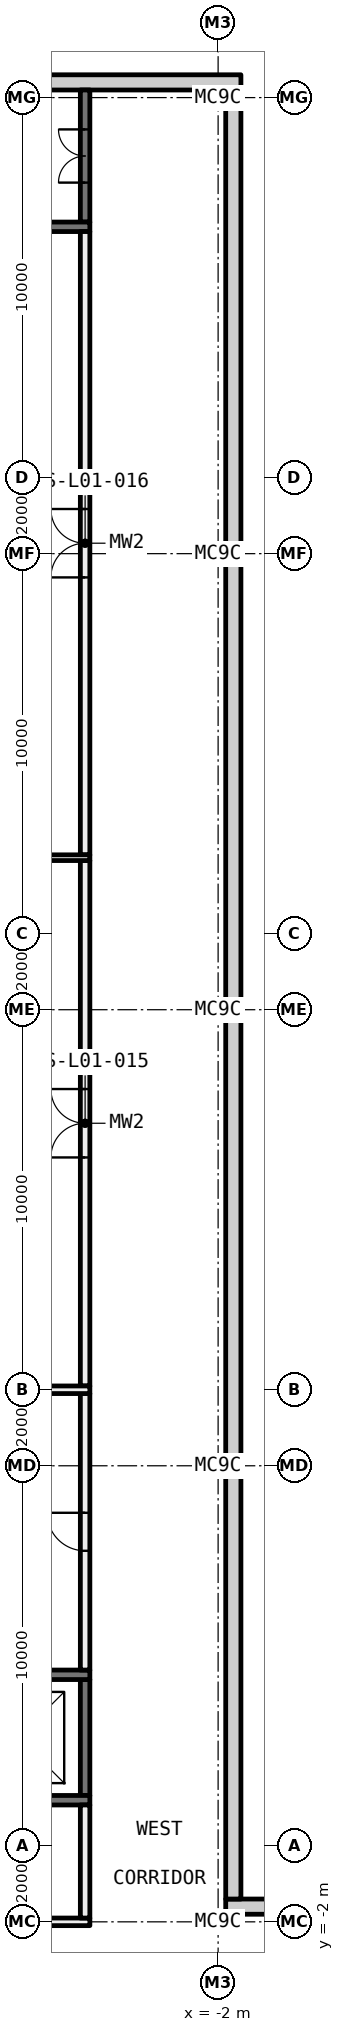
"""IFC4 building model, lengths in metres.
Left out: names, types, materials, properties, quantities, classifications, styles, units other than length and angle.
Written with IfcOpenShell. Run it as: python <this file> out.ifc"""

import sys

from ifc_helpers import new_model, si_unit, direction, frame, frame_2d, origin, origin_2d, place, context, subcontext, project, spatial, rectangle, i_section, extrude, element, fill, save


model = new_model("IFC4")
c1 = context("Model", 3, precision=1e-05, world=origin(), true_north=direction((0.0, 1.0)))
c2 = subcontext(c1, "Body", "Model", "MODEL_VIEW")
j1 = project(units=[si_unit("LENGTHUNIT", "METRE"), si_unit("PLANEANGLEUNIT", "RADIAN")], contexts=[c1])
p1 = place(None, origin())
s1 = spatial("IfcSite", under=j1, at=p1, CompositionType="ELEMENT")
p2 = place(p1, origin())
s2 = spatial("IfcBuilding", under=s1, at=p2, CompositionType="ELEMENT")
p3 = place(p2, frame((0.0, 0.0, 6.0)))
s3 = spatial("IfcBuildingStorey", under=s2, at=p3, CompositionType="ELEMENT", Elevation=6.0)
for number, where, z_axis, x_axis in (
    (1, (-2.0, -2.0, 0.0), (0.0, 0.0, 1.0), (1.0, 0.0, 0.0)),
    (2, (-2.0, 10.0, 0.0), (0.0, 0.0, 1.0), (1.0, 0.0, 0.0)),
    (3, (-2.0, 22.0, 0.0), (0.0, 0.0, 1.0), (1.0, 0.0, 0.0)),
    (4, (-2.0, 34.0, 0.0), (0.0, 0.0, 1.0), (1.0, 0.0, 0.0)),
    (5, (-2.0, 46.0, 0.0), (0.0, 0.0, 1.0), (1.0, 0.0, 0.0)),
):
    element("IfcColumn", number, at=place(p3, frame(where, z_axis=z_axis, x_axis=x_axis)), inside=s3, PredefinedType="COLUMN", context=c2, shape_type="SweptSolid", body=[
        extrude(i_section(OverallWidth=0.4, OverallDepth=0.4, WebThickness=0.013, FlangeThickness=0.021, FilletRadius=0.022, at=origin_2d()), origin(), (0.0, 0.0, 1.0), 5.6),
    ])
p4 = place(p3, frame((-12.625, -2.0, 0.0), z_axis=(0.0, 0.0, 1.0), x_axis=(1.0, 0.0, 0.0)))
e6 = element("IfcWall", 6, at=p4, inside=s3, PredefinedType="PARTITIONING", context=c2, shape_type="SweptSolid", body=[
    extrude(rectangle(XDim=7.25, YDim=0.2, at=frame_2d((3.625, 0.0))), origin(), (0.0, 0.0, 1.0), 5.012),
])
p5 = place(p4, frame((2.725, 0.0, 0.0)))
e7 = element("IfcOpeningElement", 7, at=p5, cuts=e6, PredefinedType="OPENING", context=c2, shape_type="SweptSolid", body=[
    extrude(rectangle(XDim=1.8, YDim=2.1, at=frame_2d((0.9, 1.05))), frame((0.0, 0.11, 0.0), z_axis=(0.0, -1.0, 0.0), x_axis=(1.0, 0.0, 0.0)), (0.0, 0.0, 1.0), 0.22),
])
p6 = place(p3, frame((-5.5, -1.9, 0.0), z_axis=(0.0, 0.0, 1.0), x_axis=(0.0, 1.0, 0.0)))
e8 = element("IfcWall", 8, at=p6, inside=s3, PredefinedType="PARTITIONING", context=c2, shape_type="SweptSolid", body=[
    extrude(rectangle(XDim=2.975, YDim=0.25, at=frame_2d((1.487, 0.0))), origin(), (0.0, 0.0, 1.0), 5.6),
])
p7 = place(p3, frame((-5.5, 12.1, 0.0), z_axis=(0.0, 0.0, 1.0), x_axis=(0.0, 1.0, 0.0)))
e9 = element("IfcWall", 9, at=p7, inside=s3, PredefinedType="PARTITIONING", context=c2, shape_type="SweptSolid", body=[
    extrude(rectangle(XDim=13.825, YDim=0.25, at=frame_2d((6.913, 0.0))), origin(), (0.0, 0.0, 1.0), 5.6),
])
p8 = place(p7, frame((6.013, 0.0, 0.0)))
e10 = element("IfcOpeningElement", 10, at=p8, cuts=e9, PredefinedType="OPENING", context=c2, shape_type="SweptSolid", body=[
    extrude(rectangle(XDim=1.8, YDim=2.1, at=frame_2d((0.9, 1.05))), frame((0.0, 0.135, 0.0), z_axis=(0.0, -1.0, 0.0), x_axis=(1.0, 0.0, 0.0)), (0.0, 0.0, 1.0), 0.27),
])
p9 = place(p3, frame((-5.5, 1.325, 0.0), z_axis=(0.0, 0.0, 1.0), x_axis=(0.0, 1.0, 0.0)))
e11 = element("IfcWall", 11, at=p9, inside=s3, PredefinedType="SHEAR", context=c2, shape_type="SweptSolid", body=[
    extrude(rectangle(XDim=3.05, YDim=0.25, at=frame_2d((1.525, 0.0))), origin(), (0.0, 0.0, 1.0), 5.6),
])
p10 = place(p3, frame((-5.5, 42.725, 0.0), z_axis=(0.0, 0.0, 1.0), x_axis=(0.0, 1.0, 0.0)))
e12 = element("IfcWall", 12, at=p10, inside=s3, PredefinedType="SHEAR", context=c2, shape_type="SweptSolid", body=[
    extrude(rectangle(XDim=3.475, YDim=0.25, at=frame_2d((1.737, 0.0))), origin(), (0.0, 0.0, 1.0), 5.6),
])
p11 = place(p10, frame((1.038, 0.0, 0.0)))
e13 = element("IfcOpeningElement", 13, at=p11, cuts=e12, PredefinedType="OPENING", context=c2, shape_type="SweptSolid", body=[
    extrude(rectangle(XDim=1.4, YDim=2.1, at=frame_2d((0.7, 1.05))), frame((0.0, 0.135, 0.0), z_axis=(0.0, -1.0, 0.0), x_axis=(1.0, 0.0, 0.0)), (0.0, 0.0, 1.0), 0.27),
])
p12 = place(p3, frame((-5.5, 26.075, 0.0), z_axis=(0.0, 0.0, 1.0), x_axis=(0.0, 1.0, 0.0)))
e14 = element("IfcWall", 14, at=p12, inside=s3, PredefinedType="PARTITIONING", context=c2, shape_type="SweptSolid", body=[
    extrude(rectangle(XDim=16.4, YDim=0.25, at=frame_2d((8.2, 0.0))), origin(), (0.0, 0.0, 1.0), 5.6),
])
p13 = place(p12, frame((7.3, 0.0, 0.0)))
e15 = element("IfcOpeningElement", 15, at=p13, cuts=e14, PredefinedType="OPENING", context=c2, shape_type="SweptSolid", body=[
    extrude(rectangle(XDim=1.8, YDim=2.1, at=frame_2d((0.9, 1.05))), frame((0.0, 0.135, 0.0), z_axis=(0.0, -1.0, 0.0), x_axis=(1.0, 0.0, 0.0)), (0.0, 0.0, 1.0), 0.27),
])
p14 = place(p3, frame((-5.5, 4.625, 0.0), z_axis=(0.0, 0.0, 1.0), x_axis=(0.0, 1.0, 0.0)))
e16 = element("IfcWall", 16, at=p14, inside=s3, PredefinedType="PARTITIONING", context=c2, shape_type="SweptSolid", body=[
    extrude(rectangle(XDim=7.275, YDim=0.25, at=frame_2d((3.637, 0.0))), origin(), (0.0, 0.0, 1.0), 5.6),
])
p15 = place(p14, frame((3.138, 0.0, 0.0)))
e17 = element("IfcOpeningElement", 17, at=p15, cuts=e16, PredefinedType="OPENING", context=c2, shape_type="SweptSolid", body=[
    extrude(rectangle(XDim=1.0, YDim=2.1, at=frame_2d((0.5, 1.05))), frame((0.0, 0.135, 0.0), z_axis=(0.0, -1.0, 0.0), x_axis=(1.0, 0.0, 0.0)), (0.0, 0.0, 1.0), 0.27),
])
p16 = place(p3, frame((-8.875, 1.2, 0.0), z_axis=(0.0, 0.0, 1.0), x_axis=(1.0, 0.0, 0.0)))
e18 = element("IfcWall", 18, at=p16, inside=s3, PredefinedType="SHEAR", context=c2, shape_type="SweptSolid", body=[
    extrude(rectangle(XDim=3.5, YDim=0.25, at=frame_2d((1.75, 0.0))), origin(), (0.0, 0.0, 1.0), 5.6),
])
p17 = place(p16, frame((1.075, 0.0, 0.0)))
e19 = element("IfcOpeningElement", 19, at=p17, cuts=e18, PredefinedType="OPENING", context=c2, shape_type="SweptSolid", body=[
    extrude(rectangle(XDim=1.1, YDim=2.1, at=frame_2d((0.55, 1.05))), frame((0.0, 0.135, 0.0), z_axis=(0.0, -1.0, 0.0), x_axis=(1.0, 0.0, 0.0)), (0.0, 0.0, 1.0), 0.27),
])
p18 = place(p3, frame((-26.2, 26.0, 0.0), z_axis=(0.0, 0.0, 1.0), x_axis=(1.0, 0.0, 0.0)))
e20 = element("IfcWall", 20, at=p18, inside=s3, PredefinedType="PARTITIONING", context=c2, shape_type="SweptSolid", body=[
    extrude(rectangle(XDim=20.825, YDim=0.15, at=frame_2d((10.413, 0.0))), origin(), (0.0, 0.0, 1.0), 5.6),
])
p19 = place(p3, frame((-8.0, 4.5, 0.0), z_axis=(0.0, 0.0, 1.0), x_axis=(1.0, 0.0, 0.0)))
e21 = element("IfcWall", 21, at=p19, inside=s3, PredefinedType="SHEAR", context=c2, shape_type="SweptSolid", body=[
    extrude(rectangle(XDim=2.625, YDim=0.25, at=frame_2d((1.312, 0.0))), origin(), (0.0, 0.0, 1.0), 5.6),
])
p20 = place(p3, frame((-15.125, 42.6, 0.0), z_axis=(0.0, 0.0, 1.0), x_axis=(1.0, 0.0, 0.0)))
e22 = element("IfcWall", 22, at=p20, inside=s3, PredefinedType="SHEAR", context=c2, shape_type="SweptSolid", body=[
    extrude(rectangle(XDim=9.75, YDim=0.25, at=frame_2d((4.875, 0.0))), origin(), (0.0, 0.0, 1.0), 5.6),
])
p21 = place(p3, frame((-7.8, 12.0, 0.0), z_axis=(0.0, 0.0, 1.0), x_axis=(1.0, 0.0, 0.0)))
e23 = element("IfcWall", 23, at=p21, inside=s3, PredefinedType="PARTITIONING", context=c2, shape_type="SweptSolid", body=[
    extrude(rectangle(XDim=2.425, YDim=0.2, at=frame_2d((1.212, 0.0))), origin(), (0.0, 0.0, 1.0), 5.6),
])
p22 = place(p3, frame((-1.8, -1.6, -0.4), z_axis=(0.0, 0.0, 1.0), x_axis=(1.0, 0.0, 0.0)))
e24 = element("IfcWall", 24, at=p22, inside=s3, PredefinedType="STANDARD", context=c2, shape_type="SweptSolid", body=[
    extrude(rectangle(XDim=12.4, YDim=0.4, at=frame_2d((6.2, 0.0))), origin(), (0.0, 0.0, 1.0), 6.0),
])
p23 = place(p3, frame((-1.6, -1.4, -0.4), z_axis=(0.0, 0.0, 1.0), x_axis=(0.0, 1.0, 0.0)))
e25 = element("IfcWall", 25, at=p23, inside=s3, PredefinedType="STANDARD", context=c2, shape_type="SweptSolid", body=[
    extrude(rectangle(XDim=47.6, YDim=0.4, at=frame_2d((23.8, 0.0))), origin(), (0.0, 0.0, 1.0), 6.0),
])
p24 = place(p3, frame((-26.6, 46.4, -0.4), z_axis=(0.0, 0.0, 1.0), x_axis=(1.0, 0.0, 0.0)))
e26 = element("IfcWall", 26, at=p24, inside=s3, PredefinedType="STANDARD", context=c2, shape_type="SweptSolid", body=[
    extrude(rectangle(XDim=25.2, YDim=0.4, at=frame_2d((12.6, 0.0))), origin(), (0.0, 0.0, 1.0), 6.0),
])
p25 = place(p11, origin())
e27 = element("IfcDoor", 27, at=p25, inside=s3, OperationType="DOUBLE_DOOR_SINGLE_SWING", PredefinedType="DOOR", context=c2, shape_type="SweptSolid", body=[
    extrude(rectangle(XDim=1.4, YDim=2.1, at=frame_2d((0.7, 1.05))), frame((0.0, 0.025, 0.0), z_axis=(0.0, -1.0, 0.0), x_axis=(1.0, 0.0, 0.0)), (0.0, 0.0, 1.0), 0.05),
])
fill(e13, e27)
p26 = place(p15, origin())
e28 = element("IfcDoor", 28, at=p26, inside=s3, OperationType="SINGLE_SWING_LEFT", PredefinedType="DOOR", context=c2, shape_type="SweptSolid", body=[
    extrude(rectangle(XDim=1.0, YDim=2.1, at=frame_2d((0.5, 1.05))), frame((0.0, 0.025, 0.0), z_axis=(0.0, -1.0, 0.0), x_axis=(1.0, 0.0, 0.0)), (0.0, 0.0, 1.0), 0.05),
])
fill(e17, e28)
p27 = place(p8, origin())
e29 = element("IfcDoor", 29, at=p27, inside=s3, OperationType="DOUBLE_DOOR_SINGLE_SWING", PredefinedType="DOOR", context=c2, shape_type="SweptSolid", body=[
    extrude(rectangle(XDim=1.8, YDim=2.1, at=frame_2d((0.9, 1.05))), frame((0.0, 0.025, 0.0), z_axis=(0.0, -1.0, 0.0), x_axis=(1.0, 0.0, 0.0)), (0.0, 0.0, 1.0), 0.05),
])
fill(e10, e29)
p28 = place(p13, origin())
e30 = element("IfcDoor", 30, at=p28, inside=s3, OperationType="DOUBLE_DOOR_SINGLE_SWING", PredefinedType="DOOR", context=c2, shape_type="SweptSolid", body=[
    extrude(rectangle(XDim=1.8, YDim=2.1, at=frame_2d((0.9, 1.05))), frame((0.0, 0.025, 0.0), z_axis=(0.0, -1.0, 0.0), x_axis=(1.0, 0.0, 0.0)), (0.0, 0.0, 1.0), 0.05),
])
fill(e15, e30)
save(model, sys.argv[1])
